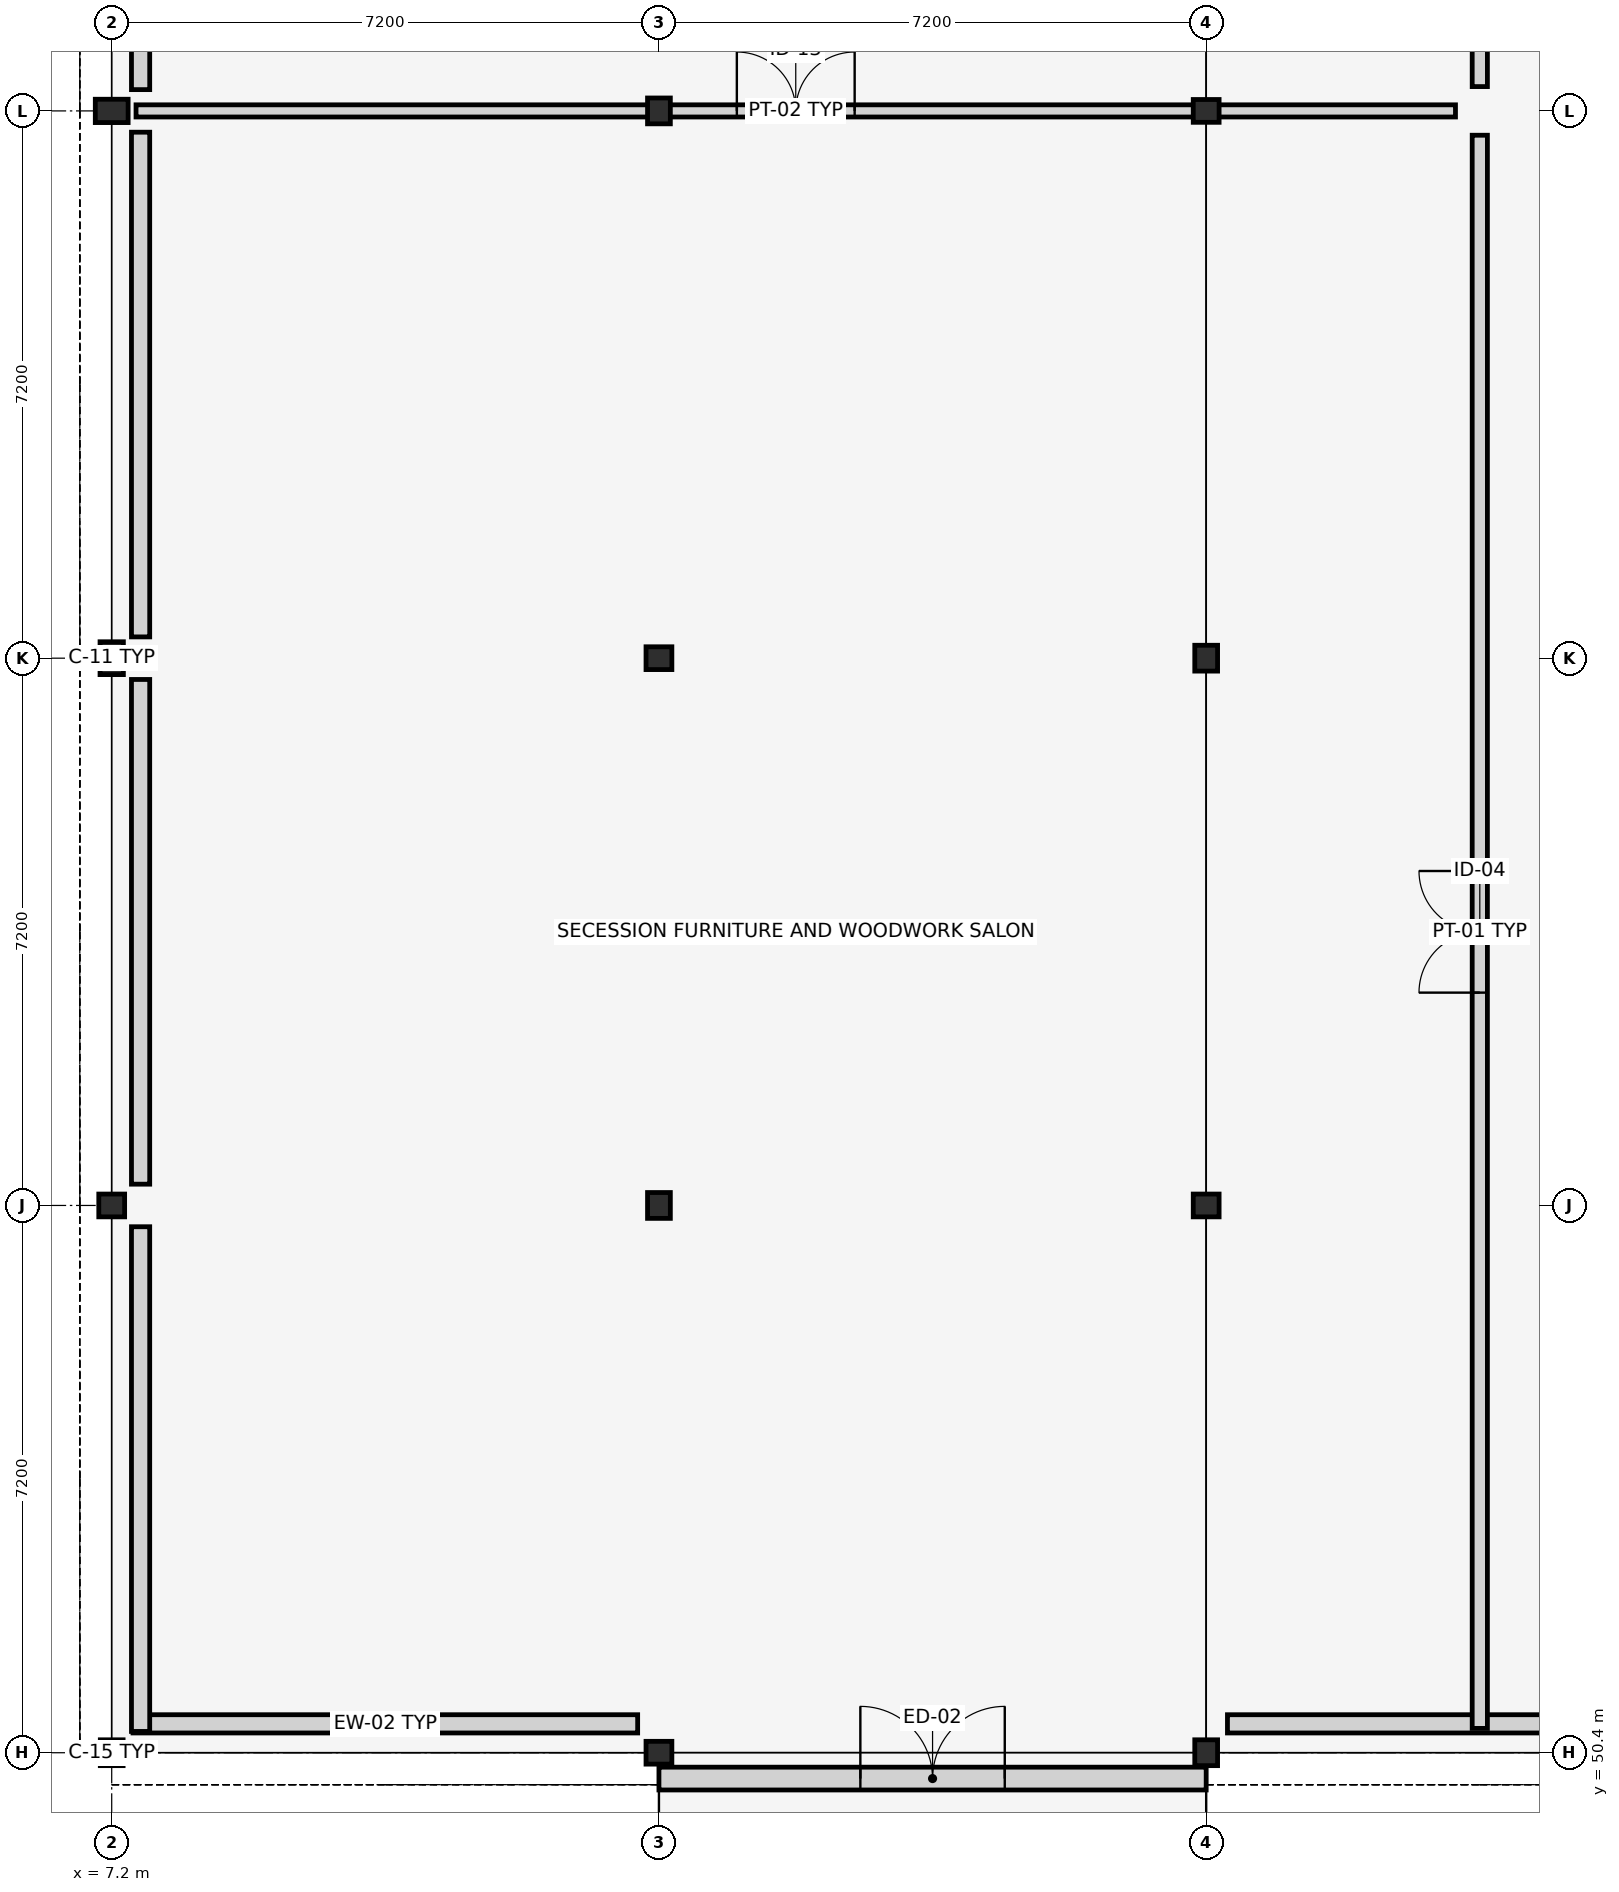
"""IFC4 building model, lengths in metres.
Left out: names, types, materials, properties, quantities, classifications, styles, units other than length and angle.
Written with IfcOpenShell. Run it as: python <this file> out.ifc"""

import sys

from ifc_helpers import new_model, si_unit, direction, frame, frame_2d, origin, origin_2d, place, context, subcontext, project, spatial, rectangle, i_section, extrude, element, fill, save


model = new_model("IFC4")
c1 = context("Model", 3, precision=1e-05, world=origin(), true_north=direction((0.0, 1.0)))
c2 = subcontext(c1, "Body", "Model", "MODEL_VIEW")
j1 = project(units=[si_unit("LENGTHUNIT", "METRE"), si_unit("PLANEANGLEUNIT", "RADIAN")], contexts=[c1])
p1 = place(None, origin())
s1 = spatial("IfcSite", under=j1, at=p1, CompositionType="ELEMENT")
p2 = place(p1, origin())
s2 = spatial("IfcBuilding", under=s1, at=p2, CompositionType="ELEMENT")
p3 = place(p2, frame((0.0, 0.0, 4.5)))
s3 = spatial("IfcBuildingStorey", under=s2, at=p3, CompositionType="ELEMENT", Elevation=4.5)
for number, where, z_axis, x_axis in (
    (1, (7.2, 50.4, 0.0), (0.0, 0.0, 1.0), (1.0, 0.0, 0.0)),
    (2, (7.2, 57.6, 0.0), (0.0, 0.0, 1.0), (0.0, 1.0, 0.0)),
):
    element("IfcColumn", number, at=place(p3, frame(where, z_axis=z_axis, x_axis=x_axis)), inside=s3, PredefinedType="COLUMN", context=c2, shape_type="SweptSolid", body=[
        extrude(i_section(OverallWidth=0.3, OverallDepth=0.34, WebThickness=0.012, FlangeThickness=0.021, FilletRadius=0.027, at=origin_2d()), origin(), (0.0, 0.0, 1.0), 4.2),
    ])
for number, where, z_axis, x_axis in (
    (3, (7.2, 64.8, 0.0), (0.0, 0.0, 1.0), (1.0, 0.0, 0.0)),
    (4, (7.2, 72.0, 0.0), (0.0, 0.0, 1.0), (0.0, 1.0, 0.0)),
):
    element("IfcColumn", number, at=place(p3, frame(where, z_axis=z_axis, x_axis=x_axis)), inside=s3, PredefinedType="COLUMN", context=c2, shape_type="SweptSolid", body=[
        extrude(i_section(OverallWidth=0.307, OverallDepth=0.432, WebThickness=0.021, FlangeThickness=0.04, FilletRadius=0.027, at=origin_2d()), origin(), (0.0, 0.0, 1.0), 4.2),
    ])
for number, where, z_axis, x_axis in (
    (5, (14.4, 50.4, 0.0), (0.0, 0.0, 1.0), (0.0, 1.0, 0.0)),
    (6, (14.4, 57.6, 0.0), (0.0, 0.0, 1.0), (1.0, 0.0, 0.0)),
    (7, (14.4, 64.8, 0.0), (0.0, 0.0, 1.0), (0.0, 1.0, 0.0)),
    (8, (14.4, 72.0, 0.0), (0.0, 0.0, 1.0), (1.0, 0.0, 0.0)),
    (9, (21.6, 50.4, 0.0), (0.0, 0.0, 1.0), (1.0, 0.0, 0.0)),
    (10, (21.6, 57.6, 0.0), (0.0, 0.0, 1.0), (0.0, 1.0, 0.0)),
    (11, (21.6, 64.8, 0.0), (0.0, 0.0, 1.0), (1.0, 0.0, 0.0)),
    (12, (21.6, 72.0, 0.0), (0.0, 0.0, 1.0), (0.0, 1.0, 0.0)),
):
    element("IfcColumn", number, at=place(p3, frame(where, z_axis=z_axis, x_axis=x_axis)), inside=s3, PredefinedType="COLUMN", context=c2, shape_type="SweptSolid", body=[
        extrude(i_section(OverallWidth=0.3, OverallDepth=0.34, WebThickness=0.012, FlangeThickness=0.021, FilletRadius=0.027, at=origin_2d()), origin(), (0.0, 0.0, 1.0), 4.2),
    ])
p4 = place(p3, frame((7.48, 50.78, 0.0), z_axis=(0.0, 0.0, 1.0), x_axis=(1.0, 0.0, 0.0)))
e13 = element("IfcWall", 13, at=p4, inside=s3, PredefinedType="STANDARD", context=c2, shape_type="SweptSolid", body=[
    extrude(rectangle(XDim=6.64, YDim=0.24, at=frame_2d((3.32, 0.0))), origin(), (0.0, 0.0, 1.0), 3.58),
])
p5 = place(p3, frame((14.4, 50.06, 0.0), z_axis=(0.0, 0.0, 1.0), x_axis=(1.0, 0.0, 0.0)))
e14 = element("IfcWall", 14, at=p5, inside=s3, PredefinedType="STANDARD", context=c2, shape_type="SweptSolid", body=[
    extrude(rectangle(XDim=7.2, YDim=0.3, at=frame_2d((3.6, 0.0))), origin(), (0.0, 0.0, 1.0), 3.65),
])
p6 = place(p5, frame((2.65, 0.0, 0.0)))
e15 = element("IfcOpeningElement", 15, at=p6, cuts=e14, PredefinedType="OPENING", context=c2, shape_type="SweptSolid", body=[
    extrude(rectangle(XDim=1.9, YDim=2.45, at=frame_2d((0.95, 1.225))), frame((0.0, 0.16, 0.0), z_axis=(0.0, -1.0, 0.0), x_axis=(1.0, 0.0, 0.0)), (0.0, 0.0, 1.0), 0.32),
])
p7 = place(p3, frame((21.88, 50.78, 0.0), z_axis=(0.0, 0.0, 1.0), x_axis=(1.0, 0.0, 0.0)))
e16 = element("IfcWall", 16, at=p7, inside=s3, PredefinedType="STANDARD", context=c2, shape_type="SweptSolid", body=[
    extrude(rectangle(XDim=6.64, YDim=0.24, at=frame_2d((3.32, 0.0))), origin(), (0.0, 0.0, 1.0), 3.58),
])
for number, where, z_axis, x_axis in (
    (17, (7.58, 78.92, 0.0), (0.0, 0.0, 1.0), (0.0, -1.0, 0.0)),
    (18, (7.58, 71.72, 0.0), (0.0, 0.0, 1.0), (0.0, -1.0, 0.0)),
):
    element("IfcWall", number, at=place(p3, frame(where, z_axis=z_axis, x_axis=x_axis)), inside=s3, PredefinedType="STANDARD", context=c2, shape_type="SweptSolid", body=[
        extrude(rectangle(XDim=6.64, YDim=0.24, at=frame_2d((3.32, 0.0))), origin(), (0.0, 0.0, 1.0), 3.58),
    ])
for number, where, z_axis, x_axis in (
    (19, (7.58, 64.52, 0.0), (0.0, 0.0, 1.0), (0.0, -1.0, 0.0)),
    (20, (7.58, 57.32, 0.0), (0.0, 0.0, 1.0), (0.0, -1.0, 0.0)),
):
    element("IfcWall", number, at=place(p3, frame(where, z_axis=z_axis, x_axis=x_axis)), inside=s3, PredefinedType="STANDARD", context=c2, shape_type="SweptSolid", body=[
        extrude(rectangle(XDim=6.64, YDim=0.24, at=frame_2d((3.32, 0.0))), origin(), (0.0, 0.0, 1.0), 3.58),
    ])
p8 = place(p3, frame((25.2, 50.72, 0.0), z_axis=(0.0, 0.0, 1.0), x_axis=(0.0, 1.0, 0.0)))
e21 = element("IfcWall", 21, at=p8, inside=s3, PredefinedType="PARTITIONING", context=c2, shape_type="SweptSolid", body=[
    extrude(rectangle(XDim=20.96, YDim=0.2, at=frame_2d((10.48, 0.0))), origin(), (0.0, 0.0, 1.0), 3.15),
])
p9 = place(p8, frame((9.68, 0.0, 0.0)))
e22 = element("IfcOpeningElement", 22, at=p9, cuts=e21, PredefinedType="OPENING", context=c2, shape_type="SweptSolid", body=[
    extrude(rectangle(XDim=1.6, YDim=2.35, at=frame_2d((0.8, 1.175))), frame((0.0, 0.11, 0.0), z_axis=(0.0, -1.0, 0.0), x_axis=(1.0, 0.0, 0.0)), (0.0, 0.0, 1.0), 0.22),
])
p10 = place(p3, frame((25.2, 72.32, 0.0), z_axis=(0.0, 0.0, 1.0), x_axis=(0.0, 1.0, 0.0)))
e23 = element("IfcWall", 23, at=p10, inside=s3, PredefinedType="PARTITIONING", context=c2, shape_type="SweptSolid", body=[
    extrude(rectangle(XDim=28.16, YDim=0.2, at=frame_2d((14.08, 0.0))), origin(), (0.0, 0.0, 1.0), 3.15),
])
p11 = place(p10, frame((1.699, 0.0, 0.0)))
e24 = element("IfcOpeningElement", 24, at=p11, cuts=e23, PredefinedType="OPENING", context=c2, shape_type="SweptSolid", body=[
    extrude(rectangle(XDim=1.5, YDim=2.25, at=frame_2d((0.75, 1.125))), frame((0.0, 0.11, 0.0), z_axis=(0.0, -1.0, 0.0), x_axis=(1.0, 0.0, 0.0)), (0.0, 0.0, 1.0), 0.22),
])
p12 = place(p3, frame((7.52, 72.0, 0.0), z_axis=(0.0, 0.0, 1.0), x_axis=(1.0, 0.0, 0.0)))
e25 = element("IfcWall", 25, at=p12, inside=s3, PredefinedType="PARTITIONING", context=c2, shape_type="SweptSolid", body=[
    extrude(rectangle(XDim=17.36, YDim=0.16, at=frame_2d((8.68, 0.0))), origin(), (0.0, 0.0, 1.0), 3.15),
])
p13 = place(p12, frame((7.905, 0.0, 0.0)))
e26 = element("IfcOpeningElement", 26, at=p13, cuts=e25, PredefinedType="OPENING", context=c2, shape_type="SweptSolid", body=[
    extrude(rectangle(XDim=1.55, YDim=2.4, at=frame_2d((0.775, 1.2))), frame((0.0, 0.09, 0.0), z_axis=(0.0, -1.0, 0.0), x_axis=(1.0, 0.0, 0.0)), (0.0, 0.0, 1.0), 0.18),
])
p14 = place(p6, origin())
e27 = element("IfcDoor", 27, at=p14, inside=s3, OperationType="DOUBLE_DOOR_SINGLE_SWING", PredefinedType="DOOR", context=c2, shape_type="SweptSolid", body=[
    extrude(rectangle(XDim=1.9, YDim=2.45, at=frame_2d((0.95, 1.225))), frame((0.0, 0.025, 0.0), z_axis=(0.0, -1.0, 0.0), x_axis=(1.0, 0.0, 0.0)), (0.0, 0.0, 1.0), 0.05),
])
fill(e15, e27)
p15 = place(p9, origin())
e28 = element("IfcDoor", 28, at=p15, inside=s3, OperationType="DOUBLE_DOOR_SINGLE_SWING", PredefinedType="DOOR", context=c2, shape_type="SweptSolid", body=[
    extrude(rectangle(XDim=1.6, YDim=2.35, at=frame_2d((0.8, 1.175))), frame((0.0, 0.025, 0.0), z_axis=(0.0, -1.0, 0.0), x_axis=(1.0, 0.0, 0.0)), (0.0, 0.0, 1.0), 0.05),
])
fill(e22, e28)
p16 = place(p13, origin())
e29 = element("IfcDoor", 29, at=p16, inside=s3, OperationType="DOUBLE_DOOR_SINGLE_SWING", PredefinedType="DOOR", context=c2, shape_type="SweptSolid", body=[
    extrude(rectangle(XDim=1.55, YDim=2.4, at=frame_2d((0.775, 1.2))), frame((0.0, 0.025, 0.0), z_axis=(0.0, -1.0, 0.0), x_axis=(1.0, 0.0, 0.0)), (0.0, 0.0, 1.0), 0.05),
])
fill(e26, e29)
save(model, sys.argv[1])
